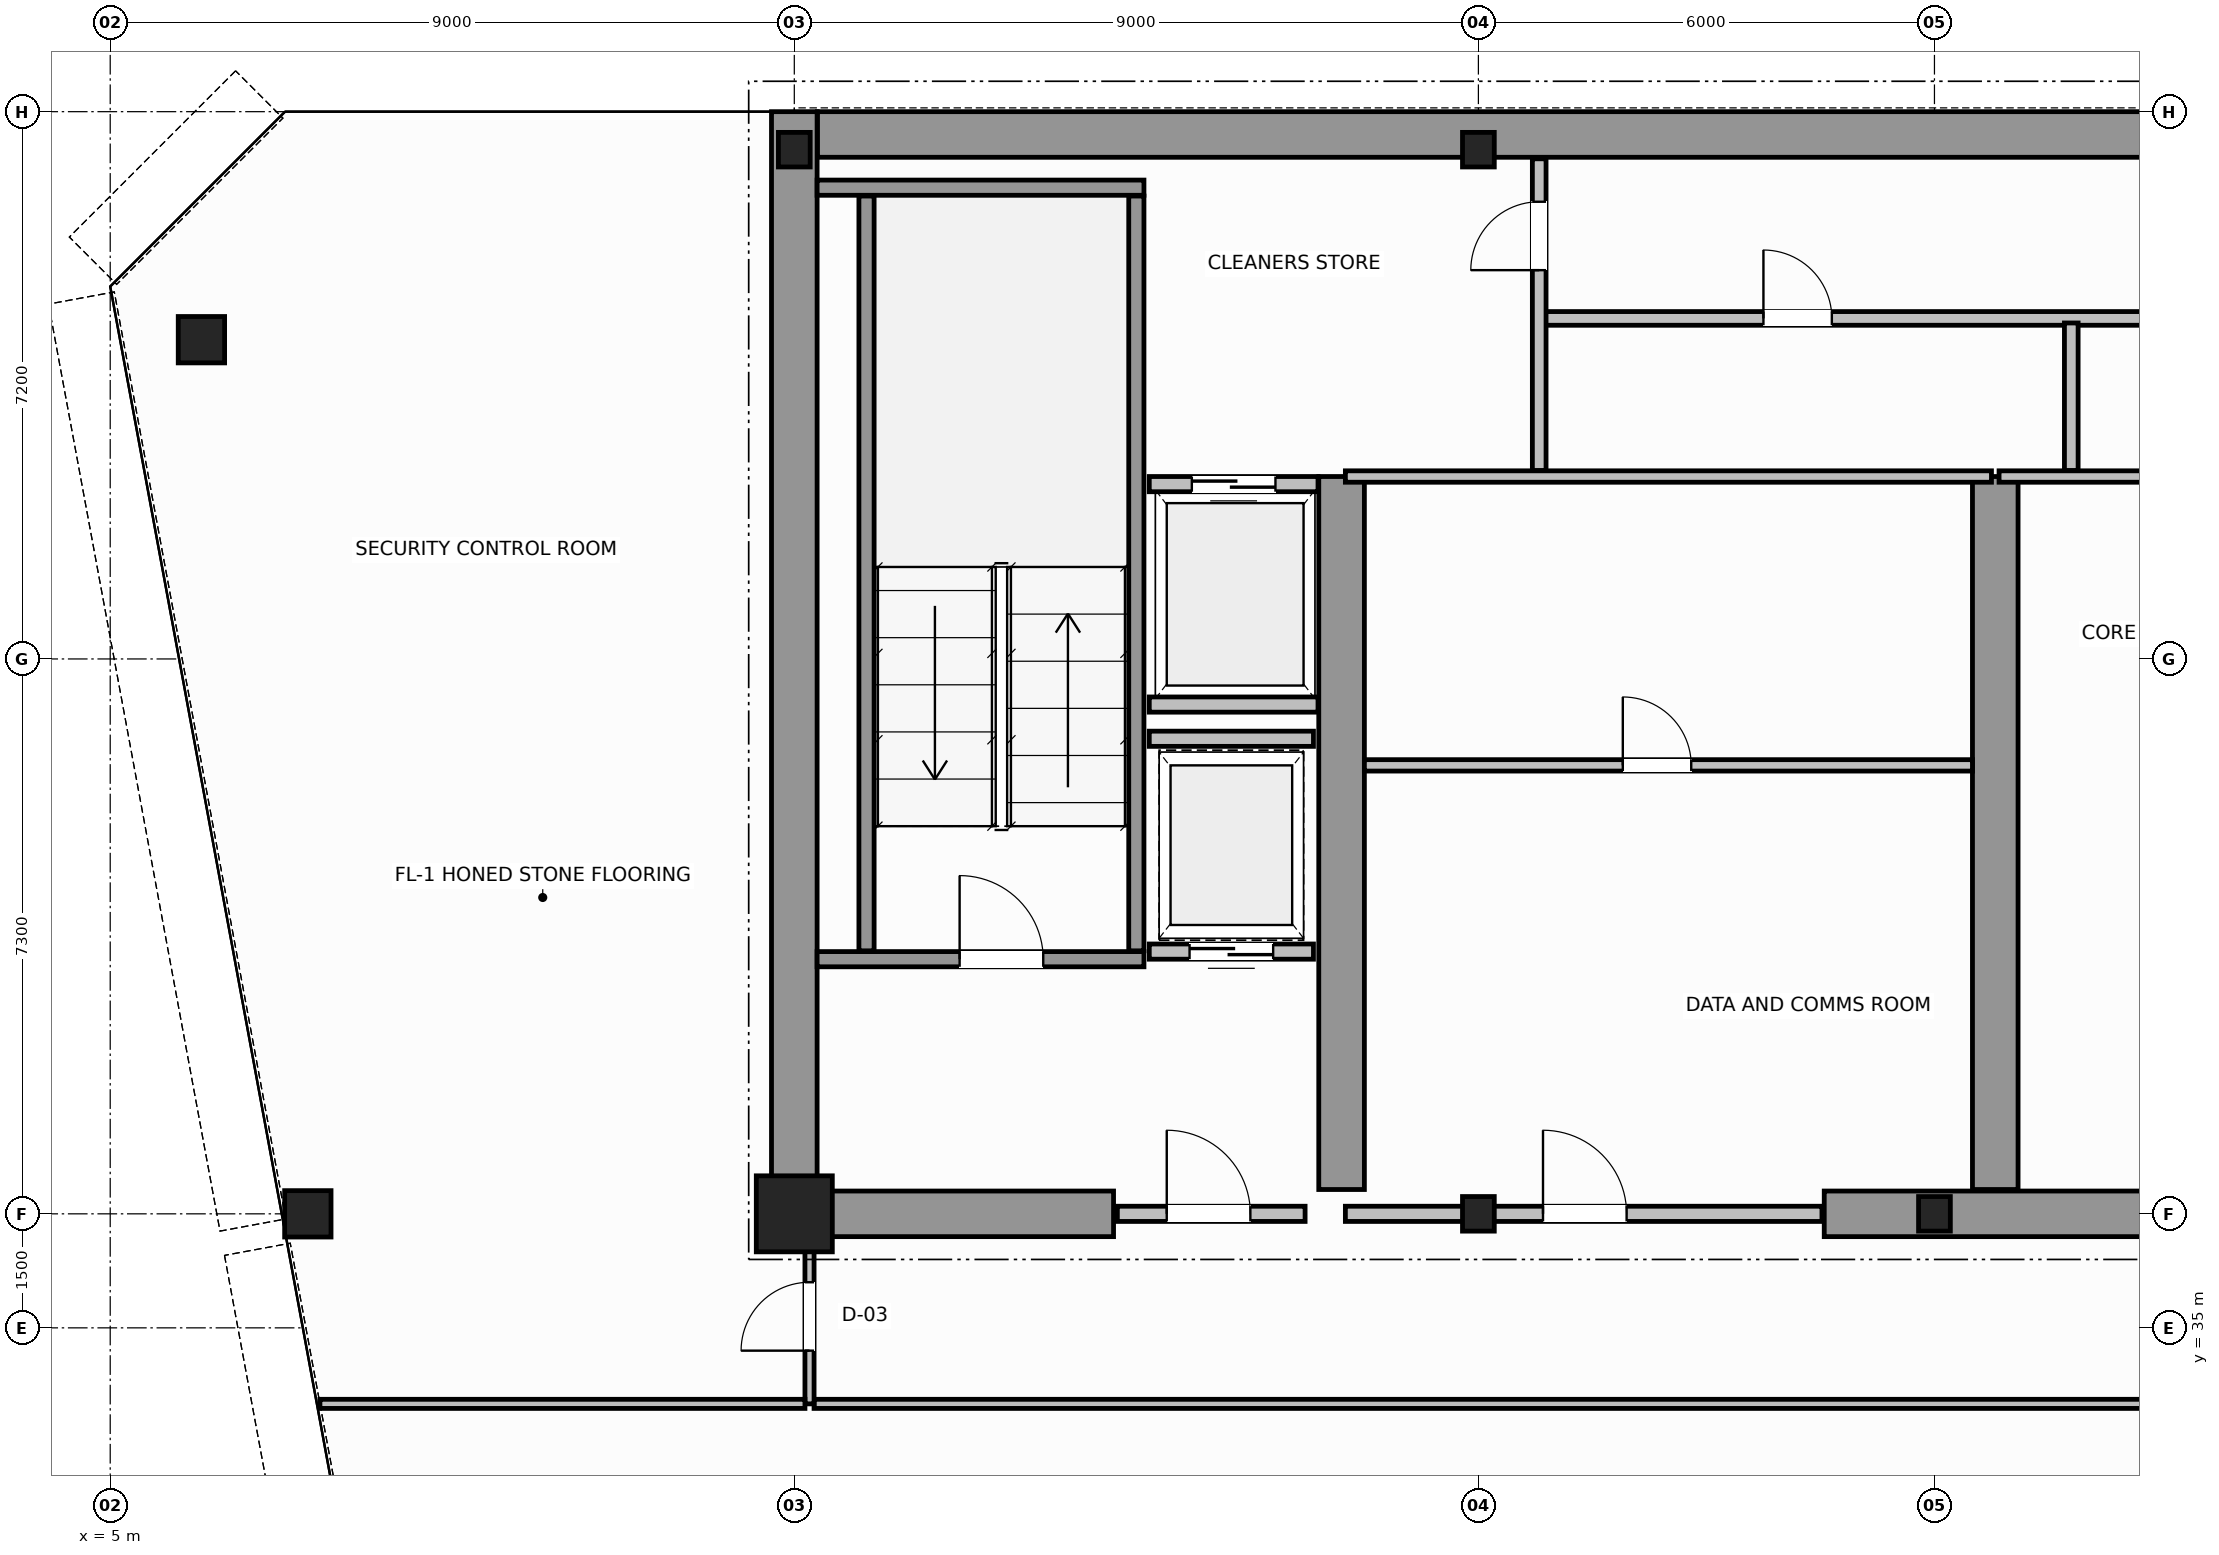
"""IFC4 building model, lengths in metres.
Left out: names, types, materials, properties, quantities, classifications, styles, units other than length and angle.
Written with IfcOpenShell. Run it as: python <this file> out.ifc"""

import sys

from ifc_helpers import new_model, si_unit, direction, frame, frame_2d, origin, origin_2d, place, context, subcontext, project, spatial, rectangle, hollow_circle, i_section, extrude, source, transform, mapped, element, fill, save


model = new_model("IFC4")
c1 = context("Model", 3, precision=1e-05, world=origin(), true_north=direction((0.0, 1.0)))
c2 = subcontext(c1, "Body", "Model", "MODEL_VIEW")
j1 = project(units=[si_unit("LENGTHUNIT", "METRE"), si_unit("PLANEANGLEUNIT", "RADIAN")], contexts=[c1])
p1 = place(None, origin())
s1 = spatial("IfcSite", under=j1, at=p1, CompositionType="ELEMENT")
p2 = place(p1, origin())
s2 = spatial("IfcBuilding", under=s1, at=p2, CompositionType="ELEMENT")
p3 = place(p2, frame((0.0, 0.0, 230.8)))
s3 = spatial("IfcBuildingStorey", under=s2, at=p3, CompositionType="ELEMENT", Elevation=230.8)
m1 = source(origin(), c2, "Body", "SweptSolid", [
    extrude(rectangle(XDim=1.0, YDim=1.0, at=origin_2d()), origin(), (0.0, 0.0, 1.0), 3.8),
])
p4 = place(p3, frame((14.0, 36.5, 0.0), z_axis=(0.0, 0.0, 1.0), x_axis=(1.0, 0.0, 0.0)))
e1 = element("IfcColumn", 1, at=p4, inside=s3, PredefinedType="COLUMN", context=c2, shape_type="MappedRepresentation", body=[
    mapped(m1, transform((0.0, 0.0, 0.0), scale=1.0)),
])
m2 = source(origin(), c2, "Body", "SweptSolid", [
    extrude(i_section(OverallWidth=0.418, OverallDepth=0.455, WebThickness=0.042, FlangeThickness=0.058, FilletRadius=0.015, at=origin_2d()), origin(), (0.0, 0.0, 1.0), 3.8),
])
for number, where, z_axis, x_axis in (
    (2, (23.0, 36.5, 0.0), (0.0, 0.0, 1.0), (1.0, 0.0, 0.0)),
    (3, (29.0, 36.5, 0.0), (0.0, 0.0, 1.0), (1.0, 0.0, 0.0)),
    (4, (14.0, 50.5, 0.0), (0.0, 0.0, 1.0), (1.0, 0.0, 0.0)),
    (5, (23.0, 50.5, 0.0), (0.0, 0.0, 1.0), (1.0, 0.0, 0.0)),
):
    element("IfcColumn", number, at=place(p3, frame(where, z_axis=z_axis, x_axis=x_axis)), inside=s3, PredefinedType="COLUMN", context=c2, shape_type="MappedRepresentation", body=[
        mapped(m2, transform((0.0, 0.0, 0.0), scale=1.0)),
    ])
m3 = source(origin(), c2, "Body", "SweptSolid", [
    extrude(hollow_circle(Radius=0.305, WallThickness=0.03, at=origin_2d()), origin(), (0.0, 0.0, 1.0), 3.8),
])
for number, where, z_axis, x_axis in (
    (6, (6.2, 48.0, 0.0), (0.0, 0.0, 1.0), (1.0, 0.0, 0.0)),
    (7, (7.6, 36.5, 0.0), (0.0, 0.0, 1.0), (1.0, 0.0, 0.0)),
):
    element("IfcColumn", number, at=place(p3, frame(where, z_axis=z_axis, x_axis=x_axis)), inside=s3, PredefinedType="COLUMN", context=c2, shape_type="MappedRepresentation", body=[
        mapped(m3, transform((0.0, 0.0, 0.0), scale=1.0)),
    ])
p5 = place(p3, frame((14.304, 50.7, 0.0), z_axis=(0.0, 0.0, 1.0), x_axis=(1.0, 0.0, 0.0)))
e8 = element("IfcWall", 8, at=p5, inside=s3, PredefinedType="SHEAR", context=c2, shape_type="SweptSolid", body=[
    extrude(rectangle(XDim=19.694, YDim=0.6, at=frame_2d((9.847, 0.0))), origin(), (0.0, 0.0, 1.0), 3.8),
])
p6 = place(p3, frame((14.0, 36.5, 0.0), z_axis=(0.0, 0.0, 1.0), x_axis=(0.0, 1.0, 0.0)))
e9 = element("IfcWall", 9, at=p6, inside=s3, PredefinedType="SHEAR", context=c2, shape_type="SweptSolid", body=[
    extrude(rectangle(XDim=14.5, YDim=0.6, at=frame_2d((7.25, 0.0))), origin(), (0.0, 0.0, 1.0), 3.8),
])
p7 = place(p3, frame((14.32, 36.5, 0.0), z_axis=(0.0, 0.0, 1.0), x_axis=(1.0, 0.0, 0.0)))
e10 = element("IfcWall", 10, at=p7, inside=s3, PredefinedType="SHEAR", context=c2, shape_type="SweptSolid", body=[
    extrude(rectangle(XDim=3.88, YDim=0.6, at=frame_2d((1.94, 0.0))), origin(), (0.0, 0.0, 1.0), 2.58),
])
p8 = place(p3, frame((27.55, 36.5, 0.0), z_axis=(0.0, 0.0, 1.0), x_axis=(1.0, 0.0, 0.0)))
e11 = element("IfcWall", 11, at=p8, inside=s3, PredefinedType="SHEAR", context=c2, shape_type="SweptSolid", body=[
    extrude(rectangle(XDim=4.5, YDim=0.6, at=frame_2d((2.25, 0.0))), origin(), (0.0, 0.0, 1.0), 3.8),
])
for number, where, z_axis, x_axis in (
    (12, (21.2, 36.82, 0.0), (0.0, 0.0, 1.0), (0.0, 1.0, 0.0)),
    (13, (29.8, 36.82, 0.0), (0.0, 0.0, 1.0), (0.0, 1.0, 0.0)),
):
    element("IfcWall", number, at=place(p3, frame(where, z_axis=z_axis, x_axis=x_axis)), inside=s3, PredefinedType="SHEAR", context=c2, shape_type="SweptSolid", body=[
        extrude(rectangle(XDim=9.38, YDim=0.6, at=frame_2d((4.69, 0.0))), origin(), (0.0, 0.0, 1.0), 3.8),
    ])
p9 = place(p3, frame((14.3, 39.85, 0.0), z_axis=(0.0, 0.0, 1.0), x_axis=(1.0, 0.0, 0.0)))
e14 = element("IfcWall", 14, at=p9, inside=s3, PredefinedType="SOLIDWALL", context=c2, shape_type="SweptSolid", body=[
    extrude(rectangle(XDim=4.3, YDim=0.2, at=frame_2d((2.15, 0.0))), origin(), (0.0, 0.0, 1.0), 3.8),
])
p10 = place(p9, frame((1.875, 0.0, 0.0)))
e15 = element("IfcOpeningElement", 15, at=p10, cuts=e14, PredefinedType="OPENING", context=c2, shape_type="SweptSolid", body=[
    extrude(rectangle(XDim=1.1, YDim=2.15, at=frame_2d((0.55, 1.075))), frame((0.0, 0.11, 0.0), z_axis=(0.0, -1.0, 0.0), x_axis=(1.0, 0.0, 0.0)), (0.0, 0.0, 1.0), 0.22),
])
p11 = place(p3, frame((14.3, 50.0, 0.0), z_axis=(0.0, 0.0, 1.0), x_axis=(1.0, 0.0, 0.0)))
e16 = element("IfcWall", 16, at=p11, inside=s3, PredefinedType="SOLIDWALL", context=c2, shape_type="SweptSolid", body=[
    extrude(rectangle(XDim=4.3, YDim=0.2, at=frame_2d((2.15, 0.0))), origin(), (0.0, 0.0, 1.0), 3.8),
])
for number, where, z_axis, x_axis in (
    (17, (14.95, 39.96, 0.0), (0.0, 0.0, 1.0), (0.0, 1.0, 0.0)),
    (18, (18.5, 39.96, 0.0), (0.0, 0.0, 1.0), (0.0, 1.0, 0.0)),
):
    element("IfcWall", number, at=place(p3, frame(where, z_axis=z_axis, x_axis=x_axis)), inside=s3, PredefinedType="SOLIDWALL", context=c2, shape_type="SweptSolid", body=[
        extrude(rectangle(XDim=9.93, YDim=0.2, at=frame_2d((4.965, 0.0))), origin(), (0.0, 0.0, 1.0), 3.8),
    ])
p12 = place(p3, frame((18.25, 36.5, 0.0), z_axis=(0.0, 0.0, 1.0), x_axis=(1.0, 0.0, 0.0)))
e19 = element("IfcWall", 19, at=p12, inside=s3, PredefinedType="SOLIDWALL", context=c2, shape_type="SweptSolid", body=[
    extrude(rectangle(XDim=2.47, YDim=0.2, at=frame_2d((1.235, 0.0))), origin(), (0.0, 0.0, 1.0), 2.57),
])
p13 = place(p12, frame((0.65, 0.0, 0.0)))
e20 = element("IfcOpeningElement", 20, at=p13, cuts=e19, PredefinedType="OPENING", context=c2, shape_type="SweptSolid", body=[
    extrude(rectangle(XDim=1.1, YDim=2.15, at=frame_2d((0.55, 1.075))), frame((0.0, 0.11, 0.0), z_axis=(0.0, -1.0, 0.0), x_axis=(1.0, 0.0, 0.0)), (0.0, 0.0, 1.0), 0.22),
])
p14 = place(p3, frame((18.67, 46.1, 0.0), z_axis=(0.0, 0.0, 1.0), x_axis=(1.0, 0.0, 0.0)))
e21 = element("IfcWall", 21, at=p14, inside=s3, PredefinedType="SOLIDWALL", context=c2, shape_type="SweptSolid", body=[
    extrude(rectangle(XDim=2.22, YDim=0.2, at=frame_2d((1.11, 0.0))), origin(), (0.0, 0.0, 1.0), 3.58),
])
p15 = place(p14, frame((0.56, 0.0, 0.0)))
e22 = element("IfcOpeningElement", 22, at=p15, cuts=e21, PredefinedType="OPENING", context=c2, shape_type="SweptSolid", body=[
    extrude(rectangle(XDim=1.1, YDim=2.15, at=frame_2d((0.55, 1.075))), frame((0.0, 0.11, 0.0), z_axis=(0.0, -1.0, 0.0), x_axis=(1.0, 0.0, 0.0)), (0.0, 0.0, 1.0), 0.22),
])
p16 = place(p3, frame((18.67, 43.2, 0.0), z_axis=(0.0, 0.0, 1.0), x_axis=(1.0, 0.0, 0.0)))
e23 = element("IfcWall", 23, at=p16, inside=s3, PredefinedType="SOLIDWALL", context=c2, shape_type="SweptSolid", body=[
    extrude(rectangle(XDim=2.22, YDim=0.2, at=frame_2d((1.11, 0.0))), origin(), (0.0, 0.0, 1.0), 3.58),
])
p17 = place(p3, frame((18.67, 39.95, 0.0), z_axis=(0.0, 0.0, 1.0), x_axis=(1.0, 0.0, 0.0)))
e24 = element("IfcWall", 24, at=p17, inside=s3, PredefinedType="SOLIDWALL", context=c2, shape_type="SweptSolid", body=[
    extrude(rectangle(XDim=2.16, YDim=0.2, at=frame_2d((1.08, 0.0))), origin(), (0.0, 0.0, 1.0), 3.58),
])
p18 = place(p17, frame((0.53, 0.0, 0.0)))
e25 = element("IfcOpeningElement", 25, at=p18, cuts=e24, PredefinedType="OPENING", context=c2, shape_type="SweptSolid", body=[
    extrude(rectangle(XDim=1.1, YDim=2.15, at=frame_2d((0.55, 1.075))), frame((0.0, 0.11, 0.0), z_axis=(0.0, -1.0, 0.0), x_axis=(1.0, 0.0, 0.0)), (0.0, 0.0, 1.0), 0.22),
])
p19 = place(p3, frame((18.67, 42.75, 0.0), z_axis=(0.0, 0.0, 1.0), x_axis=(1.0, 0.0, 0.0)))
e26 = element("IfcWall", 26, at=p19, inside=s3, PredefinedType="SOLIDWALL", context=c2, shape_type="SweptSolid", body=[
    extrude(rectangle(XDim=2.16, YDim=0.2, at=frame_2d((1.08, 0.0))), origin(), (0.0, 0.0, 1.0), 3.58),
])
p20 = place(p3, frame((21.25, 36.5, 0.0), z_axis=(0.0, 0.0, 1.0), x_axis=(1.0, 0.0, 0.0)))
e27 = element("IfcWall", 27, at=p20, inside=s3, PredefinedType="SOLIDWALL", context=c2, shape_type="SweptSolid", body=[
    extrude(rectangle(XDim=6.27, YDim=0.2, at=frame_2d((3.135, 0.0))), origin(), (0.0, 0.0, 1.0), 2.57),
])
p21 = place(p20, frame((2.6, 0.0, 0.0)))
e28 = element("IfcOpeningElement", 28, at=p21, cuts=e27, PredefinedType="OPENING", context=c2, shape_type="SweptSolid", body=[
    extrude(rectangle(XDim=1.1, YDim=2.15, at=frame_2d((0.55, 1.075))), frame((0.0, 0.11, 0.0), z_axis=(0.0, -1.0, 0.0), x_axis=(1.0, 0.0, 0.0)), (0.0, 0.0, 1.0), 0.22),
])
p22 = place(p3, frame((21.25, 46.2, 0.0), z_axis=(0.0, 0.0, 1.0), x_axis=(1.0, 0.0, 0.0)))
e29 = element("IfcWall", 29, at=p22, inside=s3, PredefinedType="PARTITIONING", context=c2, shape_type="SweptSolid", body=[
    extrude(rectangle(XDim=8.5, YDim=0.15, at=frame_2d((4.25, 0.0))), origin(), (0.0, 0.0, 1.0), 3.58),
])
p23 = place(p3, frame((21.5, 42.4, 0.0), z_axis=(0.0, 0.0, 1.0), x_axis=(1.0, 0.0, 0.0)))
e30 = element("IfcWall", 30, at=p23, inside=s3, PredefinedType="PARTITIONING", context=c2, shape_type="SweptSolid", body=[
    extrude(rectangle(XDim=8.0, YDim=0.15, at=frame_2d((4.0, 0.0))), origin(), (0.0, 0.0, 1.0), 3.58),
])
p24 = place(p23, frame((3.4, 0.0, 0.0)))
e31 = element("IfcOpeningElement", 31, at=p24, cuts=e30, PredefinedType="OPENING", context=c2, shape_type="SweptSolid", body=[
    extrude(rectangle(XDim=0.9, YDim=2.1, at=frame_2d((0.45, 1.05))), frame((0.0, 0.085, 0.0), z_axis=(0.0, -1.0, 0.0), x_axis=(1.0, 0.0, 0.0)), (0.0, 0.0, 1.0), 0.17),
])
p25 = place(p3, frame((29.85, 46.2, 0.0), z_axis=(0.0, 0.0, 1.0), x_axis=(1.0, 0.0, 0.0)))
e32 = element("IfcWall", 32, at=p25, inside=s3, PredefinedType="PARTITIONING", context=c2, shape_type="SweptSolid", body=[
    extrude(rectangle(XDim=8.5, YDim=0.15, at=frame_2d((4.25, 0.0))), origin(), (0.0, 0.0, 1.0), 3.58),
])
p26 = place(p3, frame((23.85, 48.28, 0.0), z_axis=(0.0, 0.0, 1.0), x_axis=(1.0, 0.0, 0.0)))
e33 = element("IfcWall", 33, at=p26, inside=s3, PredefinedType="PLUMBINGWALL", context=c2, shape_type="SweptSolid", body=[
    extrude(rectangle(XDim=15.03, YDim=0.18, at=frame_2d((7.515, 0.0))), origin(), (0.0, 0.0, 1.0), 3.58),
])
p27 = place(p26, frame((2.9, 0.0, 0.0)))
e34 = element("IfcOpeningElement", 34, at=p27, cuts=e33, PredefinedType="OPENING", context=c2, shape_type="SweptSolid", body=[
    extrude(rectangle(XDim=0.9, YDim=2.15, at=frame_2d((0.45, 1.075))), frame((0.0, 0.1, 0.0), z_axis=(0.0, -1.0, 0.0), x_axis=(1.0, 0.0, 0.0)), (0.0, 0.0, 1.0), 0.2),
])
p28 = place(p26, frame((10.4, 0.0, 0.0)))
e35 = element("IfcOpeningElement", 35, at=p28, cuts=e33, PredefinedType="OPENING", context=c2, shape_type="SweptSolid", body=[
    extrude(rectangle(XDim=0.9, YDim=2.15, at=frame_2d((0.45, 1.075))), frame((0.0, 0.1, 0.0), z_axis=(0.0, -1.0, 0.0), x_axis=(1.0, 0.0, 0.0)), (0.0, 0.0, 1.0), 0.2),
])
p29 = place(p3, frame((23.8, 46.28, 0.0), z_axis=(0.0, 0.0, 1.0), x_axis=(0.0, 1.0, 0.0)))
e36 = element("IfcWall", 36, at=p29, inside=s3, PredefinedType="PLUMBINGWALL", context=c2, shape_type="SweptSolid", body=[
    extrude(rectangle(XDim=4.1, YDim=0.18, at=frame_2d((2.05, 0.0))), origin(), (0.0, 0.0, 1.0), 3.58),
])
p30 = place(p29, frame((2.635, 0.0, 0.0)))
e37 = element("IfcOpeningElement", 37, at=p30, cuts=e36, PredefinedType="OPENING", context=c2, shape_type="SweptSolid", body=[
    extrude(rectangle(XDim=0.9, YDim=2.15, at=frame_2d((0.45, 1.075))), frame((0.0, 0.1, 0.0), z_axis=(0.0, -1.0, 0.0), x_axis=(1.0, 0.0, 0.0)), (0.0, 0.0, 1.0), 0.2),
])
p31 = place(p3, frame((30.8, 46.28, 0.0), z_axis=(0.0, 0.0, 1.0), x_axis=(0.0, 1.0, 0.0)))
e38 = element("IfcWall", 38, at=p31, inside=s3, PredefinedType="PLUMBINGWALL", context=c2, shape_type="SweptSolid", body=[
    extrude(rectangle(XDim=1.94, YDim=0.18, at=frame_2d((0.97, 0.0))), origin(), (0.0, 0.0, 1.0), 3.58),
])
p32 = place(p3, frame((14.26, 34.0, 0.0), z_axis=(0.0, 0.0, 1.0), x_axis=(1.0, 0.0, 0.0)))
e39 = element("IfcWall", 39, at=p32, inside=s3, PredefinedType="PARTITIONING", context=c2, shape_type="SweptSolid", body=[
    extrude(rectangle(XDim=20.28, YDim=0.12, at=frame_2d((10.14, 0.0))), origin(), (0.0, 0.0, 1.0), 3.58),
])
p33 = place(p3, frame((14.2, 34.0, 0.0), z_axis=(0.0, 0.0, 1.0), x_axis=(0.0, 1.0, 0.0)))
e40 = element("IfcWall", 40, at=p33, inside=s3, PredefinedType="PARTITIONING", context=c2, shape_type="SweptSolid", body=[
    extrude(rectangle(XDim=2.44, YDim=0.12, at=frame_2d((1.22, 0.0))), origin(), (0.0, 0.0, 1.0), 3.58),
])
p34 = place(p33, frame((0.7, 0.0, 0.0)))
e41 = element("IfcOpeningElement", 41, at=p34, cuts=e40, PredefinedType="OPENING", context=c2, shape_type="SweptSolid", body=[
    extrude(rectangle(XDim=0.9, YDim=2.15, at=frame_2d((0.45, 1.075))), frame((0.0, 0.07, 0.0), z_axis=(0.0, -1.0, 0.0), x_axis=(1.0, 0.0, 0.0)), (0.0, 0.0, 1.0), 0.14),
])
p35 = place(p3, frame((7.759, 34.0, 0.0), z_axis=(0.0, 0.0, 1.0), x_axis=(1.0, 0.0, 0.0)))
e42 = element("IfcWall", 42, at=p35, inside=s3, PredefinedType="PARTITIONING", context=c2, shape_type="SweptSolid", body=[
    extrude(rectangle(XDim=6.381, YDim=0.12, at=frame_2d((3.19, 0.0))), origin(), (0.0, 0.0, 1.0), 3.58),
])
m4 = source(origin(), c2, "Body", "SweptSolid", [
    extrude(rectangle(XDim=1.1, YDim=2.15, at=frame_2d((0.55, 1.075))), frame((0.0, 0.025, 0.0), z_axis=(0.0, -1.0, 0.0), x_axis=(1.0, 0.0, 0.0)), (0.0, 0.0, 1.0), 0.05),
])
p36 = place(p10, origin())
e43 = element("IfcDoor", 43, at=p36, inside=s3, OperationType="SINGLE_SWING_LEFT", PredefinedType="DOOR", context=c2, shape_type="MappedRepresentation", body=[
    mapped(m4, transform((0.0, 0.0, 0.0), scale=1.0)),
])
fill(e15, e43)
p37 = place(p13, origin())
e44 = element("IfcDoor", 44, at=p37, inside=s3, OperationType="SINGLE_SWING_RIGHT", PredefinedType="DOOR", context=c2, shape_type="MappedRepresentation", body=[
    mapped(m4, transform((0.0, 0.0, 0.0), scale=1.0)),
])
fill(e20, e44)
p38 = place(p15, origin())
e45 = element("IfcDoor", 45, at=p38, inside=s3, OperationType="DOUBLE_DOOR_SLIDING", PredefinedType="DOOR", context=c2, shape_type="MappedRepresentation", body=[
    mapped(m4, transform((0.0, 0.0, 0.0), scale=1.0)),
])
fill(e22, e45)
p39 = place(p18, origin())
e46 = element("IfcDoor", 46, at=p39, inside=s3, OperationType="DOUBLE_DOOR_SLIDING", PredefinedType="DOOR", context=c2, shape_type="MappedRepresentation", body=[
    mapped(m4, transform((0.0, 0.0, 0.0), scale=1.0)),
])
fill(e25, e46)
p40 = place(p21, origin())
e47 = element("IfcDoor", 47, at=p40, inside=s3, OperationType="SINGLE_SWING_LEFT", PredefinedType="DOOR", context=c2, shape_type="MappedRepresentation", body=[
    mapped(m4, transform((0.0, 0.0, 0.0), scale=1.0)),
])
fill(e28, e47)
m5 = source(origin(), c2, "Body", "SweptSolid", [
    extrude(rectangle(XDim=0.9, YDim=2.1, at=frame_2d((0.45, 1.05))), frame((0.0, 0.025, 0.0), z_axis=(0.0, -1.0, 0.0), x_axis=(1.0, 0.0, 0.0)), (0.0, 0.0, 1.0), 0.05),
])
p41 = place(p24, origin())
e48 = element("IfcDoor", 48, at=p41, inside=s3, OperationType="SINGLE_SWING_RIGHT", PredefinedType="DOOR", context=c2, shape_type="MappedRepresentation", body=[
    mapped(m5, transform((0.0, 0.0, 0.0), scale=1.0)),
])
fill(e31, e48)
m6 = source(origin(), c2, "Body", "SweptSolid", [
    extrude(rectangle(XDim=0.9, YDim=2.15, at=frame_2d((0.45, 1.075))), frame((0.0, 0.025, 0.0), z_axis=(0.0, -1.0, 0.0), x_axis=(1.0, 0.0, 0.0)), (0.0, 0.0, 1.0), 0.05),
])
p42 = place(p30, origin())
e49 = element("IfcDoor", 49, at=p42, inside=s3, OperationType="SINGLE_SWING_LEFT", PredefinedType="DOOR", context=c2, shape_type="MappedRepresentation", body=[
    mapped(m6, transform((0.0, 0.0, 0.0), scale=1.0)),
])
fill(e37, e49)
p43 = place(p27, origin())
e50 = element("IfcDoor", 50, at=p43, inside=s3, OperationType="SINGLE_SWING_RIGHT", PredefinedType="DOOR", context=c2, shape_type="MappedRepresentation", body=[
    mapped(m6, transform((0.0, 0.0, 0.0), scale=1.0)),
])
fill(e34, e50)
p44 = place(p34, origin())
e51 = element("IfcDoor", 51, at=p44, inside=s3, OperationType="SINGLE_SWING_LEFT", PredefinedType="DOOR", context=c2, shape_type="MappedRepresentation", body=[
    mapped(m6, transform((0.0, 0.0, 0.0), scale=1.0)),
])
fill(e41, e51)
save(model, sys.argv[1])
